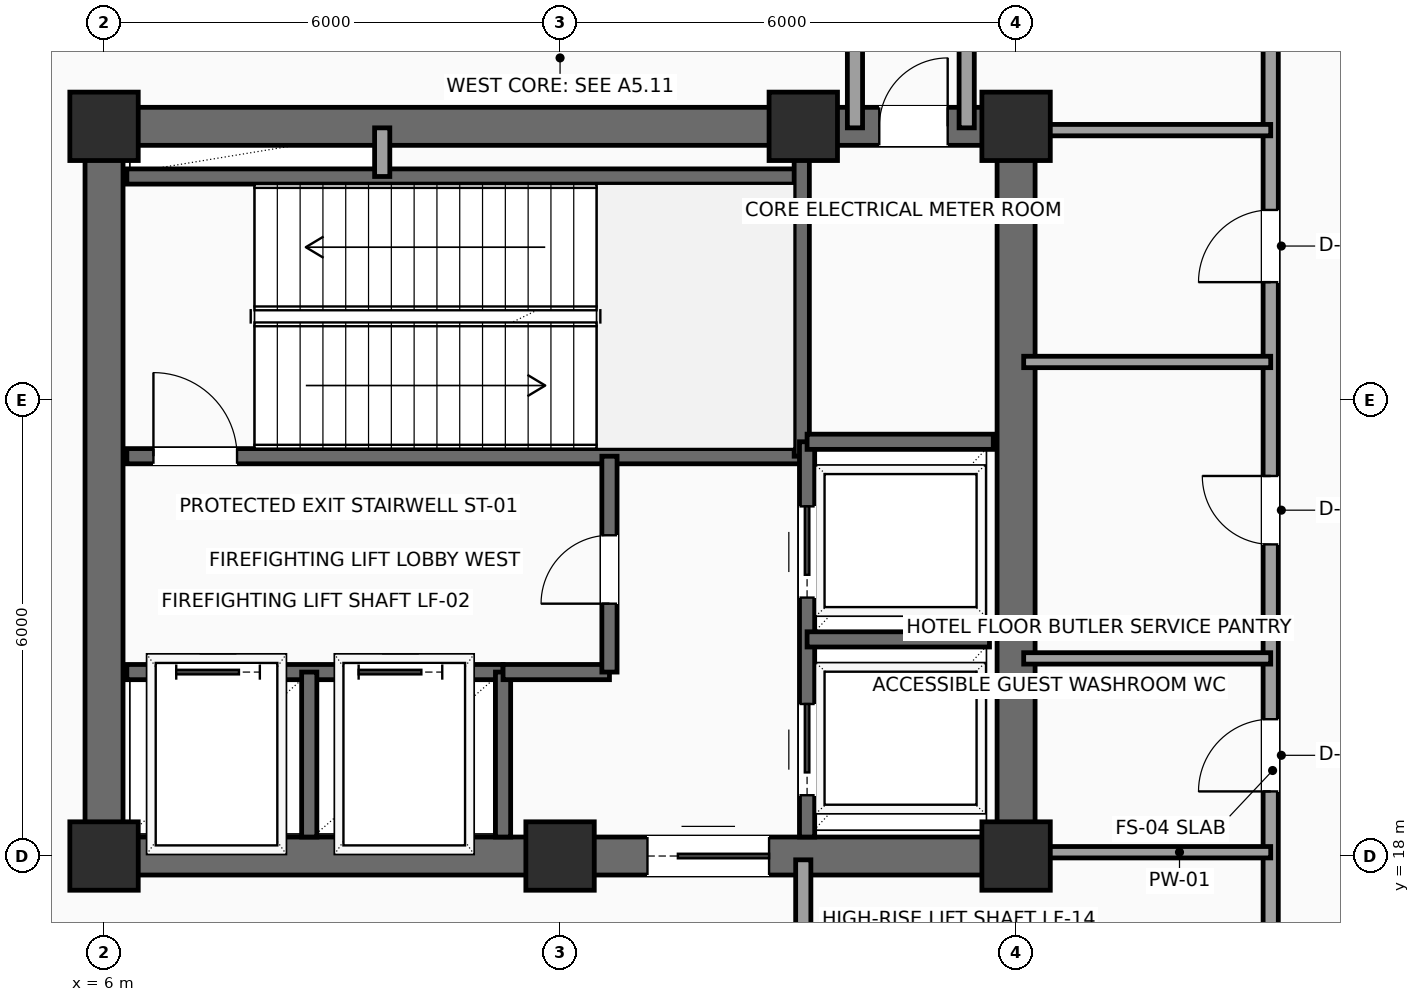
"""IFC4 building model, lengths in metres.
Left out: names, types, materials, properties, quantities, classifications, styles, units other than length and angle.
Written with IfcOpenShell. Run it as: python <this file> out.ifc"""

import sys

from ifc_helpers import new_model, si_unit, direction, frame, frame_2d, origin, origin_2d, place, context, subcontext, project, spatial, rectangle, extrude, element, fill, save


model = new_model("IFC4")
c1 = context("Model", 3, precision=1e-05, world=origin(), true_north=direction((0.0, 1.0)))
c2 = subcontext(c1, "Body", "Model", "MODEL_VIEW")
j1 = project(units=[si_unit("LENGTHUNIT", "METRE"), si_unit("PLANEANGLEUNIT", "RADIAN")], contexts=[c1])
p1 = place(None, origin())
s1 = spatial("IfcSite", under=j1, at=p1, CompositionType="ELEMENT")
p2 = place(p1, origin())
s2 = spatial("IfcBuilding", under=s1, at=p2, CompositionType="ELEMENT")
p3 = place(p2, frame((0.0, 0.0, 199.2)))
s3 = spatial("IfcBuildingStorey", under=s2, at=p3, CompositionType="ELEMENT", Elevation=199.2)
for number, where, z_axis, x_axis in (
    (1, (6.0, 18.0, 0.0), (0.0, 0.0, 1.0), (1.0, 0.0, 0.0)),
    (2, (12.0, 18.0, 0.0), (0.0, 0.0, 1.0), (1.0, 0.0, 0.0)),
    (3, (18.0, 18.0, 0.0), (0.0, 0.0, 1.0), (1.0, 0.0, 0.0)),
    (4, (6.0, 27.6, 0.0), (0.0, 0.0, 1.0), (1.0, 0.0, 0.0)),
    (5, (15.2, 27.6, 0.0), (0.0, 0.0, 1.0), (1.0, 0.0, 0.0)),
    (6, (18.0, 27.6, 0.0), (0.0, 0.0, 1.0), (1.0, 0.0, 0.0)),
):
    element("IfcColumn", number, at=place(p3, frame(where, z_axis=z_axis, x_axis=x_axis)), inside=s3, PredefinedType="COLUMN", context=c2, shape_type="SweptSolid", body=[
        extrude(rectangle(XDim=0.9, YDim=0.9, at=origin_2d()), origin(), (0.0, 0.0, 1.0), 4.8),
    ])
p4 = place(p3, frame((6.0, 18.0, 0.0), z_axis=(0.0, 0.0, 1.0), x_axis=(1.0, 0.0, 0.0)))
e7 = element("IfcWall", 7, at=p4, inside=s3, PredefinedType="SHEAR", context=c2, shape_type="SweptSolid", body=[
    extrude(rectangle(XDim=12.0, YDim=0.5, at=frame_2d((6.0, 0.0))), origin(), (0.0, 0.0, 1.0), 4.5),
])
p5 = place(p4, frame((7.15, 0.0, 0.0)))
e8 = element("IfcOpeningElement", 8, at=p5, cuts=e7, PredefinedType="OPENING", context=c2, shape_type="SweptSolid", body=[
    extrude(rectangle(XDim=1.6, YDim=2.3, at=frame_2d((0.8, 1.15))), frame((0.0, 0.26, 0.0), z_axis=(0.0, -1.0, 0.0), x_axis=(1.0, 0.0, 0.0)), (0.0, 0.0, 1.0), 0.52),
])
p6 = place(p3, frame((6.0, 27.6, 0.0), z_axis=(0.0, 0.0, 1.0), x_axis=(1.0, 0.0, 0.0)))
e9 = element("IfcWall", 9, at=p6, inside=s3, PredefinedType="SHEAR", context=c2, shape_type="SweptSolid", body=[
    extrude(rectangle(XDim=12.0, YDim=0.5, at=frame_2d((6.0, 0.0))), origin(), (0.0, 0.0, 1.0), 4.5),
])
p7 = place(p6, frame((10.2, 0.0, 0.0)))
e10 = element("IfcOpeningElement", 10, at=p7, cuts=e9, PredefinedType="OPENING", context=c2, shape_type="SweptSolid", body=[
    extrude(rectangle(XDim=0.9, YDim=2.15, at=frame_2d((0.45, 1.075))), frame((0.0, 0.26, 0.0), z_axis=(0.0, -1.0, 0.0), x_axis=(1.0, 0.0, 0.0)), (0.0, 0.0, 1.0), 0.52),
])
for number, where, z_axis, x_axis in (
    (11, (6.0, 18.0, 0.0), (0.0, 0.0, 1.0), (0.0, 1.0, 0.0)),
    (12, (18.0, 18.0, 0.0), (0.0, 0.0, 1.0), (0.0, 1.0, 0.0)),
):
    element("IfcWall", number, at=place(p3, frame(where, z_axis=z_axis, x_axis=x_axis)), inside=s3, PredefinedType="SHEAR", context=c2, shape_type="SweptSolid", body=[
        extrude(rectangle(XDim=9.6, YDim=0.5, at=frame_2d((4.8, 0.0))), origin(), (0.0, 0.0, 1.0), 4.5),
    ])
p8 = place(p3, frame((6.3, 23.26, 0.0), z_axis=(0.0, 0.0, 1.0), x_axis=(1.0, 0.0, 0.0)))
e13 = element("IfcWall", 13, at=p8, inside=s3, PredefinedType="SHEAR", context=c2, shape_type="SweptSolid", body=[
    extrude(rectangle(XDim=8.88, YDim=0.2, at=frame_2d((4.44, 0.0))), origin(), (0.0, 0.0, 1.0), 4.5),
])
p9 = place(p8, frame((0.35, 0.0, 0.0)))
e14 = element("IfcOpeningElement", 14, at=p9, cuts=e13, PredefinedType="OPENING", context=c2, shape_type="SweptSolid", body=[
    extrude(rectangle(XDim=1.1, YDim=2.2, at=frame_2d((0.55, 1.1))), frame((0.0, 0.11, 0.0), z_axis=(0.0, -1.0, 0.0), x_axis=(1.0, 0.0, 0.0)), (0.0, 0.0, 1.0), 0.22),
])
p10 = place(p3, frame((6.3, 26.94, 0.0), z_axis=(0.0, 0.0, 1.0), x_axis=(1.0, 0.0, 0.0)))
e15 = element("IfcWall", 15, at=p10, inside=s3, PredefinedType="SHEAR", context=c2, shape_type="SweptSolid", body=[
    extrude(rectangle(XDim=8.88, YDim=0.2, at=frame_2d((4.44, 0.0))), origin(), (0.0, 0.0, 1.0), 4.5),
])
p11 = place(p3, frame((15.18, 23.26, 0.0), z_axis=(0.0, 0.0, 1.0), x_axis=(0.0, 1.0, 0.0)))
e16 = element("IfcWall", 16, at=p11, inside=s3, PredefinedType="SHEAR", context=c2, shape_type="SweptSolid", body=[
    extrude(rectangle(XDim=4.04, YDim=0.2, at=frame_2d((2.02, 0.0))), origin(), (0.0, 0.0, 1.0), 4.5),
])
p12 = place(p3, frame((6.3, 20.42, 0.0), z_axis=(0.0, 0.0, 1.0), x_axis=(1.0, 0.0, 0.0)))
e17 = element("IfcWall", 17, at=p12, inside=s3, PredefinedType="SHEAR", context=c2, shape_type="SweptSolid", body=[
    extrude(rectangle(XDim=4.95, YDim=0.2, at=frame_2d((2.475, 0.0))), origin(), (0.0, 0.0, 1.0), 4.5),
])
p13 = place(p12, frame((0.65, 0.0, 0.0)))
e18 = element("IfcOpeningElement", 18, at=p13, cuts=e17, PredefinedType="OPENING", context=c2, shape_type="SweptSolid", body=[
    extrude(rectangle(XDim=1.1, YDim=2.2, at=frame_2d((0.55, 1.1))), frame((0.0, 0.11, 0.0), z_axis=(0.0, -1.0, 0.0), x_axis=(1.0, 0.0, 0.0)), (0.0, 0.0, 1.0), 0.22),
])
p14 = place(p12, frame((3.05, 0.0, 0.0)))
e19 = element("IfcOpeningElement", 19, at=p14, cuts=e17, PredefinedType="OPENING", context=c2, shape_type="SweptSolid", body=[
    extrude(rectangle(XDim=1.1, YDim=2.2, at=frame_2d((0.55, 1.1))), frame((0.0, 0.11, 0.0), z_axis=(0.0, -1.0, 0.0), x_axis=(1.0, 0.0, 0.0)), (0.0, 0.0, 1.0), 0.22),
])
for number, where, z_axis, x_axis in (
    (20, (8.7, 18.25, 0.0), (0.0, 0.0, 1.0), (0.0, 1.0, 0.0)),
    (21, (11.25, 18.25, 0.0), (0.0, 0.0, 1.0), (0.0, 1.0, 0.0)),
):
    element("IfcWall", number, at=place(p3, frame(where, z_axis=z_axis, x_axis=x_axis)), inside=s3, PredefinedType="SHEAR", context=c2, shape_type="SweptSolid", body=[
        extrude(rectangle(XDim=2.17, YDim=0.2, at=frame_2d((1.085, 0.0))), origin(), (0.0, 0.0, 1.0), 4.5),
    ])
p15 = place(p3, frame((11.25, 20.42, 0.0), z_axis=(0.0, 0.0, 1.0), x_axis=(1.0, 0.0, 0.0)))
e22 = element("IfcWall", 22, at=p15, inside=s3, PredefinedType="SHEAR", context=c2, shape_type="SweptSolid", body=[
    extrude(rectangle(XDim=1.4, YDim=0.2, at=frame_2d((0.7, 0.0))), origin(), (0.0, 0.0, 1.0), 4.5),
])
p16 = place(p3, frame((12.65, 20.42, 0.0), z_axis=(0.0, 0.0, 1.0), x_axis=(0.0, 1.0, 0.0)))
e23 = element("IfcWall", 23, at=p16, inside=s3, PredefinedType="SHEAR", context=c2, shape_type="SweptSolid", body=[
    extrude(rectangle(XDim=2.84, YDim=0.2, at=frame_2d((1.42, 0.0))), origin(), (0.0, 0.0, 1.0), 4.5),
])
p17 = place(p16, frame((0.9, 0.0, 0.0)))
e24 = element("IfcOpeningElement", 24, at=p17, cuts=e23, PredefinedType="OPENING", context=c2, shape_type="SweptSolid", body=[
    extrude(rectangle(XDim=0.9, YDim=2.15, at=frame_2d((0.45, 1.075))), frame((0.0, 0.11, 0.0), z_axis=(0.0, -1.0, 0.0), x_axis=(1.0, 0.0, 0.0)), (0.0, 0.0, 1.0), 0.22),
])
p18 = place(p3, frame((9.66, 26.94, 0.0), z_axis=(0.0, 0.0, 1.0), x_axis=(0.0, 1.0, 0.0)))
e25 = element("IfcWall", 25, at=p18, inside=s3, PredefinedType="SOLIDWALL", context=c2, shape_type="SweptSolid", body=[
    extrude(rectangle(XDim=0.64, YDim=0.2, at=frame_2d((0.32, 0.0))), origin(), (0.0, 0.0, 1.0), 4.5),
])
p19 = place(p3, frame((15.25, 18.25, 0.0), z_axis=(0.0, 0.0, 1.0), x_axis=(0.0, 1.0, 0.0)))
e26 = element("IfcWall", 26, at=p19, inside=s3, PredefinedType="SHEAR", context=c2, shape_type="SweptSolid", body=[
    extrude(rectangle(XDim=5.2, YDim=0.2, at=frame_2d((2.6, 0.0))), origin(), (0.0, 0.0, 1.0), 4.5),
])
p20 = place(p19, frame((0.55, 0.0, 0.0)))
e27 = element("IfcOpeningElement", 27, at=p20, cuts=e26, PredefinedType="OPENING", context=c2, shape_type="SweptSolid", body=[
    extrude(rectangle(XDim=1.2, YDim=2.2, at=frame_2d((0.6, 1.1))), frame((0.0, 0.11, 0.0), z_axis=(0.0, -1.0, 0.0), x_axis=(1.0, 0.0, 0.0)), (0.0, 0.0, 1.0), 0.22),
])
p21 = place(p19, frame((3.15, 0.0, 0.0)))
e28 = element("IfcOpeningElement", 28, at=p21, cuts=e26, PredefinedType="OPENING", context=c2, shape_type="SweptSolid", body=[
    extrude(rectangle(XDim=1.2, YDim=2.2, at=frame_2d((0.6, 1.1))), frame((0.0, 0.11, 0.0), z_axis=(0.0, -1.0, 0.0), x_axis=(1.0, 0.0, 0.0)), (0.0, 0.0, 1.0), 0.22),
])
p22 = place(p3, frame((15.25, 20.85, 0.0), z_axis=(0.0, 0.0, 1.0), x_axis=(1.0, 0.0, 0.0)))
e29 = element("IfcWall", 29, at=p22, inside=s3, PredefinedType="SHEAR", context=c2, shape_type="SweptSolid", body=[
    extrude(rectangle(XDim=2.4, YDim=0.2, at=frame_2d((1.2, 0.0))), origin(), (0.0, 0.0, 1.0), 4.5),
])
p23 = place(p3, frame((15.25, 23.45, 0.0), z_axis=(0.0, 0.0, 1.0), x_axis=(1.0, 0.0, 0.0)))
e30 = element("IfcWall", 30, at=p23, inside=s3, PredefinedType="SHEAR", context=c2, shape_type="SweptSolid", body=[
    extrude(rectangle(XDim=2.45, YDim=0.2, at=frame_2d((1.225, 0.0))), origin(), (0.0, 0.0, 1.0), 4.5),
])
p24 = place(p3, frame((15.2, 17.95, 0.0), z_axis=(0.0, 0.0, 1.0), x_axis=(0.0, -1.0, 0.0)))
e31 = element("IfcWall", 31, at=p24, inside=s3, PredefinedType="SOLIDWALL", context=c2, shape_type="SweptSolid", body=[
    extrude(rectangle(XDim=2.4, YDim=0.2, at=frame_2d((1.2, 0.0))), origin(), (0.0, 0.0, 1.0), 4.5),
])
p25 = place(p3, frame((21.35, 11.65, 0.0), z_axis=(0.0, 0.0, 1.0), x_axis=(0.0, 1.0, 0.0)))
e32 = element("IfcWall", 32, at=p25, inside=s3, PredefinedType="SOLIDWALL", context=c2, shape_type="SweptSolid", body=[
    extrude(rectangle(XDim=18.6, YDim=0.2, at=frame_2d((9.3, 0.0))), origin(), (0.0, 0.0, 1.0), 4.5),
])
p26 = place(p25, frame((7.2, 0.0, 0.0)))
e33 = element("IfcOpeningElement", 33, at=p26, cuts=e32, PredefinedType="OPENING", context=c2, shape_type="SweptSolid", body=[
    extrude(rectangle(XDim=0.95, YDim=2.15, at=frame_2d((0.475, 1.075))), frame((0.0, 0.11, 0.0), z_axis=(0.0, -1.0, 0.0), x_axis=(1.0, 0.0, 0.0)), (0.0, 0.0, 1.0), 0.22),
])
p27 = place(p25, frame((10.45, 0.0, 0.0)))
e34 = element("IfcOpeningElement", 34, at=p27, cuts=e32, PredefinedType="OPENING", context=c2, shape_type="SweptSolid", body=[
    extrude(rectangle(XDim=0.9, YDim=2.1, at=frame_2d((0.45, 1.05))), frame((0.0, 0.11, 0.0), z_axis=(0.0, -1.0, 0.0), x_axis=(1.0, 0.0, 0.0)), (0.0, 0.0, 1.0), 0.22),
])
p28 = place(p25, frame((13.9, 0.0, 0.0)))
e35 = element("IfcOpeningElement", 35, at=p28, cuts=e32, PredefinedType="OPENING", context=c2, shape_type="SweptSolid", body=[
    extrude(rectangle(XDim=0.95, YDim=2.15, at=frame_2d((0.475, 1.075))), frame((0.0, 0.11, 0.0), z_axis=(0.0, -1.0, 0.0), x_axis=(1.0, 0.0, 0.0)), (0.0, 0.0, 1.0), 0.22),
])
for number, where, z_axis, x_axis in (
    (36, (17.35, 30.25, 0.0), (0.0, 0.0, 1.0), (0.0, -1.0, 0.0)),
    (37, (15.88, 27.58, 0.0), (0.0, 0.0, 1.0), (0.0, 1.0, 0.0)),
):
    element("IfcWall", number, at=place(p3, frame(where, z_axis=z_axis, x_axis=x_axis)), inside=s3, PredefinedType="SOLIDWALL", context=c2, shape_type="SweptSolid", body=[
        extrude(rectangle(XDim=2.67, YDim=0.2, at=frame_2d((1.335, 0.0))), origin(), (0.0, 0.0, 1.0), 4.5),
    ])
p29 = place(p3, frame((18.1, 18.05, 0.0), z_axis=(0.0, 0.0, 1.0), x_axis=(1.0, 0.0, 0.0)))
e38 = element("IfcWall", 38, at=p29, inside=s3, PredefinedType="PARTITIONING", context=c2, shape_type="SweptSolid", body=[
    extrude(rectangle(XDim=3.25, YDim=0.15, at=frame_2d((1.625, 0.0))), origin(), (0.0, 0.0, 1.0), 4.092),
])
for number, where, z_axis, x_axis in (
    (39, (18.1, 20.6, 0.0), (0.0, 0.0, 1.0), (1.0, 0.0, 0.0)),
    (40, (18.1, 24.5, 0.0), (0.0, 0.0, 1.0), (1.0, 0.0, 0.0)),
    (41, (18.1, 27.55, 0.0), (0.0, 0.0, 1.0), (1.0, 0.0, 0.0)),
):
    element("IfcWall", number, at=place(p3, frame(where, z_axis=z_axis, x_axis=x_axis)), inside=s3, PredefinedType="PARTITIONING", context=c2, shape_type="SweptSolid", body=[
        extrude(rectangle(XDim=3.25, YDim=0.15, at=frame_2d((1.625, 0.0))), origin(), (0.0, 0.0, 1.0), 4.5),
    ])
p30 = place(p5, origin())
e42 = element("IfcDoor", 42, at=p30, inside=s3, OperationType="DOUBLE_DOOR_SLIDING", PredefinedType="DOOR", context=c2, shape_type="SweptSolid", body=[
    extrude(rectangle(XDim=1.6, YDim=2.3, at=frame_2d((0.8, 1.15))), frame((0.0, 0.025, 0.0), z_axis=(0.0, -1.0, 0.0), x_axis=(1.0, 0.0, 0.0)), (0.0, 0.0, 1.0), 0.05),
])
fill(e8, e42)
p31 = place(p7, origin())
e43 = element("IfcDoor", 43, at=p31, inside=s3, OperationType="SINGLE_SWING_RIGHT", PredefinedType="DOOR", context=c2, shape_type="SweptSolid", body=[
    extrude(rectangle(XDim=0.9, YDim=2.15, at=frame_2d((0.45, 1.075))), frame((0.0, 0.025, 0.0), z_axis=(0.0, -1.0, 0.0), x_axis=(1.0, 0.0, 0.0)), (0.0, 0.0, 1.0), 0.05),
])
fill(e10, e43)
p32 = place(p9, origin())
e44 = element("IfcDoor", 44, at=p32, inside=s3, OperationType="SINGLE_SWING_LEFT", PredefinedType="DOOR", context=c2, shape_type="SweptSolid", body=[
    extrude(rectangle(XDim=1.1, YDim=2.2, at=frame_2d((0.55, 1.1))), frame((0.0, 0.025, 0.0), z_axis=(0.0, -1.0, 0.0), x_axis=(1.0, 0.0, 0.0)), (0.0, 0.0, 1.0), 0.05),
])
fill(e14, e44)
p33 = place(p13, origin())
e45 = element("IfcDoor", 45, at=p33, inside=s3, OperationType="SLIDING_TO_LEFT", PredefinedType="DOOR", context=c2, shape_type="SweptSolid", body=[
    extrude(rectangle(XDim=1.1, YDim=2.2, at=frame_2d((0.55, 1.1))), frame((0.0, 0.025, 0.0), z_axis=(0.0, -1.0, 0.0), x_axis=(1.0, 0.0, 0.0)), (0.0, 0.0, 1.0), 0.05),
])
fill(e18, e45)
p34 = place(p14, origin())
e46 = element("IfcDoor", 46, at=p34, inside=s3, OperationType="SLIDING_TO_LEFT", PredefinedType="DOOR", context=c2, shape_type="SweptSolid", body=[
    extrude(rectangle(XDim=1.1, YDim=2.2, at=frame_2d((0.55, 1.1))), frame((0.0, 0.025, 0.0), z_axis=(0.0, -1.0, 0.0), x_axis=(1.0, 0.0, 0.0)), (0.0, 0.0, 1.0), 0.05),
])
fill(e19, e46)
p35 = place(p17, origin())
e47 = element("IfcDoor", 47, at=p35, inside=s3, OperationType="SINGLE_SWING_LEFT", PredefinedType="DOOR", context=c2, shape_type="SweptSolid", body=[
    extrude(rectangle(XDim=0.9, YDim=2.15, at=frame_2d((0.45, 1.075))), frame((0.0, 0.025, 0.0), z_axis=(0.0, -1.0, 0.0), x_axis=(1.0, 0.0, 0.0)), (0.0, 0.0, 1.0), 0.05),
])
fill(e24, e47)
p36 = place(p20, origin())
e48 = element("IfcDoor", 48, at=p36, inside=s3, OperationType="SLIDING_TO_RIGHT", PredefinedType="DOOR", context=c2, shape_type="SweptSolid", body=[
    extrude(rectangle(XDim=1.2, YDim=2.2, at=frame_2d((0.6, 1.1))), frame((0.0, 0.025, 0.0), z_axis=(0.0, -1.0, 0.0), x_axis=(1.0, 0.0, 0.0)), (0.0, 0.0, 1.0), 0.05),
])
fill(e27, e48)
p37 = place(p21, origin())
e49 = element("IfcDoor", 49, at=p37, inside=s3, OperationType="SLIDING_TO_RIGHT", PredefinedType="DOOR", context=c2, shape_type="SweptSolid", body=[
    extrude(rectangle(XDim=1.2, YDim=2.2, at=frame_2d((0.6, 1.1))), frame((0.0, 0.025, 0.0), z_axis=(0.0, -1.0, 0.0), x_axis=(1.0, 0.0, 0.0)), (0.0, 0.0, 1.0), 0.05),
])
fill(e28, e49)
p38 = place(p26, origin())
e50 = element("IfcDoor", 50, at=p38, inside=s3, OperationType="SINGLE_SWING_LEFT", PredefinedType="DOOR", context=c2, shape_type="SweptSolid", body=[
    extrude(rectangle(XDim=0.95, YDim=2.15, at=frame_2d((0.475, 1.075))), frame((0.0, 0.025, 0.0), z_axis=(0.0, -1.0, 0.0), x_axis=(1.0, 0.0, 0.0)), (0.0, 0.0, 1.0), 0.05),
])
fill(e33, e50)
p39 = place(p27, origin())
e51 = element("IfcDoor", 51, at=p39, inside=s3, OperationType="SINGLE_SWING_RIGHT", PredefinedType="DOOR", context=c2, shape_type="SweptSolid", body=[
    extrude(rectangle(XDim=0.9, YDim=2.1, at=frame_2d((0.45, 1.05))), frame((0.0, 0.025, 0.0), z_axis=(0.0, -1.0, 0.0), x_axis=(1.0, 0.0, 0.0)), (0.0, 0.0, 1.0), 0.05),
])
fill(e34, e51)
p40 = place(p28, origin())
e52 = element("IfcDoor", 52, at=p40, inside=s3, OperationType="SINGLE_SWING_LEFT", PredefinedType="DOOR", context=c2, shape_type="SweptSolid", body=[
    extrude(rectangle(XDim=0.95, YDim=2.15, at=frame_2d((0.475, 1.075))), frame((0.0, 0.025, 0.0), z_axis=(0.0, -1.0, 0.0), x_axis=(1.0, 0.0, 0.0)), (0.0, 0.0, 1.0), 0.05),
])
fill(e35, e52)
save(model, sys.argv[1])
